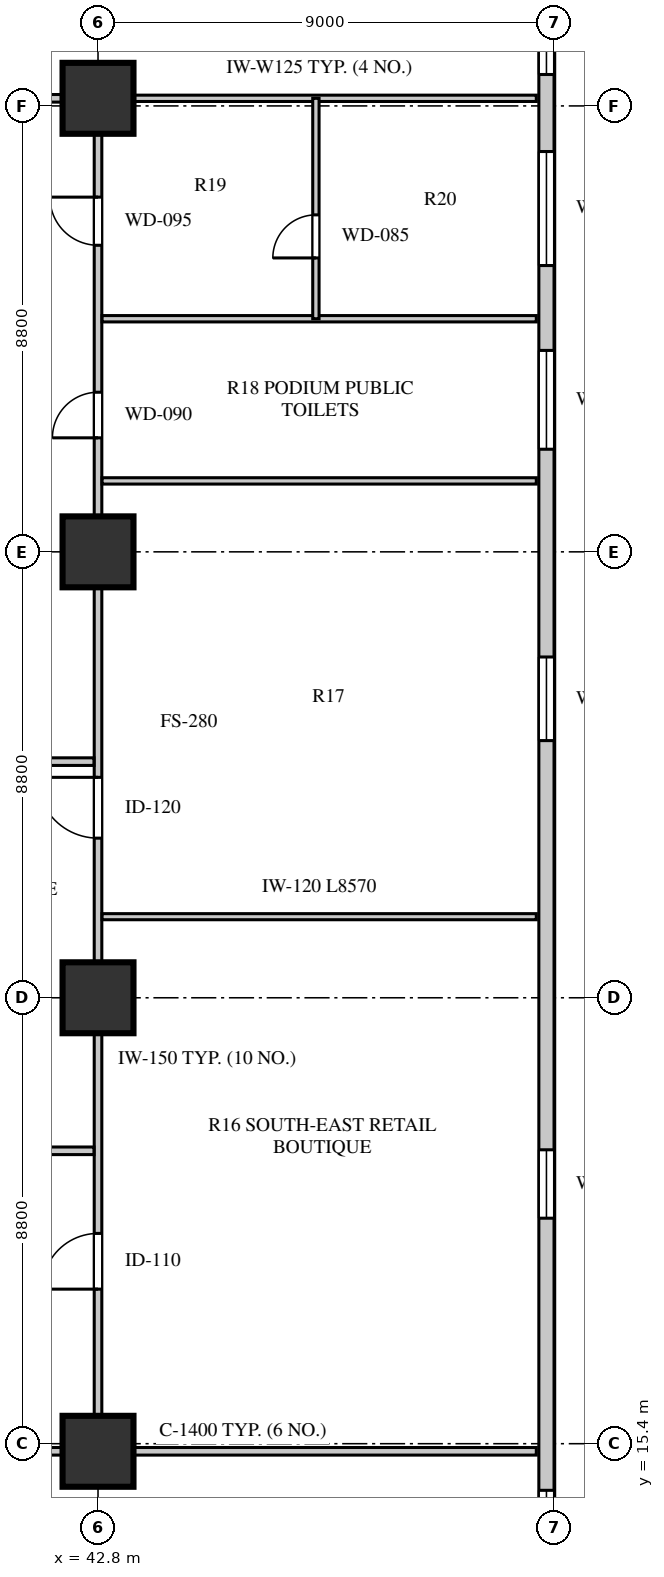
"""IFC4 building model, lengths in metres.
Left out: names, types, materials, properties, quantities, classifications, styles, units other than length and angle.
Written with IfcOpenShell. Run it as: python <this file> out.ifc"""

import sys

from ifc_helpers import new_model, si_unit, direction, frame, frame_2d, origin, origin_2d, place, context, subcontext, project, spatial, rectangle, extrude, element, fill, save


model = new_model("IFC4")
c1 = context("Model", 3, precision=1e-05, world=origin(), true_north=direction((0.0, 1.0)))
c2 = subcontext(c1, "Body", "Model", "MODEL_VIEW")
j1 = project(units=[si_unit("LENGTHUNIT", "METRE"), si_unit("PLANEANGLEUNIT", "RADIAN")], contexts=[c1])
p1 = place(None, origin())
s1 = spatial("IfcSite", under=j1, at=p1, CompositionType="ELEMENT")
p2 = place(p1, origin())
s2 = spatial("IfcBuilding", under=s1, at=p2, CompositionType="ELEMENT")
p3 = place(p2, frame((0.0, 0.0, 12.5)))
s3 = spatial("IfcBuildingStorey", under=s2, at=p3, CompositionType="ELEMENT", Elevation=12.5)
for number, where, z_axis, x_axis in (
    (1, (42.8, 15.25, 0.0), (0.0, 0.0, 1.0), (1.0, 0.0, 0.0)),
    (2, (42.8, 24.2, 0.0), (0.0, 0.0, 1.0), (1.0, 0.0, 0.0)),
    (3, (42.8, 33.0, 0.0), (0.0, 0.0, 1.0), (1.0, 0.0, 0.0)),
    (4, (42.8, 41.95, 0.0), (0.0, 0.0, 1.0), (1.0, 0.0, 0.0)),
):
    element("IfcColumn", number, at=place(p3, frame(where, z_axis=z_axis, x_axis=x_axis)), inside=s3, PredefinedType="COLUMN", context=c2, shape_type="SweptSolid", body=[
        extrude(rectangle(XDim=1.4, YDim=1.4, at=origin_2d()), origin(), (0.0, 0.0, 1.0), 4.22),
    ])
p4 = place(p3, frame((51.65, 12.4, 0.0), z_axis=(0.0, 0.0, 1.0), x_axis=(0.0, 1.0, 0.0)))
e5 = element("IfcWall", 5, at=p4, inside=s3, PredefinedType="STANDARD", context=c2, shape_type="SweptSolid", body=[
    extrude(rectangle(XDim=32.4, YDim=0.3, at=frame_2d((16.2, 0.0))), origin(), (0.0, 0.0, 1.0), 4.22),
])
p5 = place(p4, frame((0.88, 0.0, 0.8)))
e6 = element("IfcOpeningElement", 6, at=p5, cuts=e5, PredefinedType="OPENING", context=c2, shape_type="SweptSolid", body=[
    extrude(rectangle(XDim=1.2, YDim=1.75, at=frame_2d((0.6, 0.875))), frame((0.0, 0.16, 0.0), z_axis=(0.0, -1.0, 0.0), x_axis=(1.0, 0.0, 0.0)), (0.0, 0.0, 1.0), 0.32),
])
p6 = place(p4, frame((7.45, 0.0, 0.8)))
e7 = element("IfcOpeningElement", 7, at=p6, cuts=e5, PredefinedType="OPENING", context=c2, shape_type="SweptSolid", body=[
    extrude(rectangle(XDim=1.35, YDim=1.9, at=frame_2d((0.675, 0.95))), frame((0.0, 0.16, 0.0), z_axis=(0.0, -1.0, 0.0), x_axis=(1.0, 0.0, 0.0)), (0.0, 0.0, 1.0), 0.32),
])
p7 = place(p4, frame((16.875, 0.0, 0.8)))
e8 = element("IfcOpeningElement", 8, at=p7, cuts=e5, PredefinedType="OPENING", context=c2, shape_type="SweptSolid", body=[
    extrude(rectangle(XDim=1.65, YDim=1.95, at=frame_2d((0.825, 0.975))), frame((0.0, 0.16, 0.0), z_axis=(0.0, -1.0, 0.0), x_axis=(1.0, 0.0, 0.0)), (0.0, 0.0, 1.0), 0.32),
])
p8 = place(p4, frame((22.625, 0.0, 0.8)))
e9 = element("IfcOpeningElement", 9, at=p8, cuts=e5, PredefinedType="OPENING", context=c2, shape_type="SweptSolid", body=[
    extrude(rectangle(XDim=1.95, YDim=2.0, at=frame_2d((0.975, 1.0))), frame((0.0, 0.16, 0.0), z_axis=(0.0, -1.0, 0.0), x_axis=(1.0, 0.0, 0.0)), (0.0, 0.0, 1.0), 0.32),
])
p9 = place(p4, frame((26.25, 0.0, 0.8)))
e10 = element("IfcOpeningElement", 10, at=p9, cuts=e5, PredefinedType="OPENING", context=c2, shape_type="SweptSolid", body=[
    extrude(rectangle(XDim=2.25, YDim=2.0, at=frame_2d((1.125, 1.0))), frame((0.0, 0.16, 0.0), z_axis=(0.0, -1.0, 0.0), x_axis=(1.0, 0.0, 0.0)), (0.0, 0.0, 1.0), 0.32),
])
p10 = place(p4, frame((30.02, 0.0, 0.8)))
e11 = element("IfcOpeningElement", 11, at=p10, cuts=e5, PredefinedType="OPENING", context=c2, shape_type="SweptSolid", body=[
    extrude(rectangle(XDim=1.8, YDim=2.0, at=frame_2d((0.9, 1.0))), frame((0.0, 0.16, 0.0), z_axis=(0.0, -1.0, 0.0), x_axis=(1.0, 0.0, 0.0)), (0.0, 0.0, 1.0), 0.32),
])
p11 = place(p3, frame((42.8, 15.25, 0.0), z_axis=(0.0, 0.0, 1.0), x_axis=(0.0, 1.0, 0.0)))
e12 = element("IfcWall", 12, at=p11, inside=s3, PredefinedType="PARTITIONING", context=c2, shape_type="SweptSolid", body=[
    extrude(rectangle(XDim=26.7, YDim=0.15, at=frame_2d((13.35, 0.0))), origin(), (0.0, 0.0, 1.0), 3.42),
])
p12 = place(p11, frame((3.2, 0.0, 0.0)))
e13 = element("IfcOpeningElement", 13, at=p12, cuts=e12, PredefinedType="OPENING", context=c2, shape_type="SweptSolid", body=[
    extrude(rectangle(XDim=1.1, YDim=2.08, at=frame_2d((0.55, 1.04))), frame((0.0, 0.085, 0.0), z_axis=(0.0, -1.0, 0.0), x_axis=(1.0, 0.0, 0.0)), (0.0, 0.0, 1.0), 0.17),
])
p13 = place(p11, frame((12.1, 0.0, 0.0)))
e14 = element("IfcOpeningElement", 14, at=p13, cuts=e12, PredefinedType="OPENING", context=c2, shape_type="SweptSolid", body=[
    extrude(rectangle(XDim=1.2, YDim=2.1, at=frame_2d((0.6, 1.05))), frame((0.0, 0.085, 0.0), z_axis=(0.0, -1.0, 0.0), x_axis=(1.0, 0.0, 0.0)), (0.0, 0.0, 1.0), 0.17),
])
p14 = place(p11, frame((20.0, 0.0, 0.0)))
e15 = element("IfcOpeningElement", 15, at=p14, cuts=e12, PredefinedType="OPENING", context=c2, shape_type="SweptSolid", body=[
    extrude(rectangle(XDim=0.9, YDim=2.05, at=frame_2d((0.45, 1.025))), frame((0.0, 0.085, 0.0), z_axis=(0.0, -1.0, 0.0), x_axis=(1.0, 0.0, 0.0)), (0.0, 0.0, 1.0), 0.17),
])
p15 = place(p11, frame((23.8, 0.0, 0.0)))
e16 = element("IfcOpeningElement", 16, at=p15, cuts=e12, PredefinedType="OPENING", context=c2, shape_type="SweptSolid", body=[
    extrude(rectangle(XDim=0.95, YDim=2.05, at=frame_2d((0.475, 1.025))), frame((0.0, 0.085, 0.0), z_axis=(0.0, -1.0, 0.0), x_axis=(1.0, 0.0, 0.0)), (0.0, 0.0, 1.0), 0.17),
])
p16 = place(p3, frame((38.75, 15.25, 0.0), z_axis=(0.0, 0.0, 1.0), x_axis=(1.0, 0.0, 0.0)))
e17 = element("IfcWall", 17, at=p16, inside=s3, PredefinedType="PARTITIONING", context=c2, shape_type="SweptSolid", body=[
    extrude(rectangle(XDim=12.7, YDim=0.15, at=frame_2d((6.35, 0.0))), origin(), (0.0, 0.0, 1.0), 3.42),
])
p17 = place(p3, frame((42.88, 41.95, 0.0), z_axis=(0.0, 0.0, 1.0), x_axis=(1.0, 0.0, 0.0)))
e18 = element("IfcWall", 18, at=p17, inside=s3, PredefinedType="PLUMBINGWALL", context=c2, shape_type="SweptSolid", body=[
    extrude(rectangle(XDim=8.57, YDim=0.125, at=frame_2d((4.285, 0.0))), origin(), (0.0, 0.0, 1.0), 3.72),
])
p18 = place(p3, frame((38.92, 21.18, 0.0), z_axis=(0.0, 0.0, 1.0), x_axis=(1.0, 0.0, 0.0)))
e19 = element("IfcWall", 19, at=p18, inside=s3, PredefinedType="PARTITIONING", context=c2, shape_type="SweptSolid", body=[
    extrude(rectangle(XDim=3.8, YDim=0.15, at=frame_2d((1.9, 0.0))), origin(), (0.0, 0.0, 1.0), 4.22),
])
p19 = place(p18, frame((1.1, 0.0, 0.0)))
e20 = element("IfcOpeningElement", 20, at=p19, cuts=e19, PredefinedType="OPENING", context=c2, shape_type="SweptSolid", body=[
    extrude(rectangle(XDim=1.05, YDim=2.1, at=frame_2d((0.525, 1.05))), frame((0.0, 0.085, 0.0), z_axis=(0.0, -1.0, 0.0), x_axis=(1.0, 0.0, 0.0)), (0.0, 0.0, 1.0), 0.17),
])
p20 = place(p3, frame((39.28, 28.86, 0.0), z_axis=(0.0, 0.0, 1.0), x_axis=(1.0, 0.0, 0.0)))
e21 = element("IfcWall", 21, at=p20, inside=s3, PredefinedType="PARTITIONING", context=c2, shape_type="SweptSolid", body=[
    extrude(rectangle(XDim=3.44, YDim=0.15, at=frame_2d((1.72, 0.0))), origin(), (0.0, 0.0, 1.0), 4.22),
])
p21 = place(p20, frame((0.74, 0.0, 0.0)))
e22 = element("IfcOpeningElement", 22, at=p21, cuts=e21, PredefinedType="OPENING", context=c2, shape_type="SweptSolid", body=[
    extrude(rectangle(XDim=0.95, YDim=2.08, at=frame_2d((0.475, 1.04))), frame((0.0, 0.085, 0.0), z_axis=(0.0, -1.0, 0.0), x_axis=(1.0, 0.0, 0.0)), (0.0, 0.0, 1.0), 0.17),
])
p22 = place(p3, frame((38.92, 41.95, 0.0), z_axis=(0.0, 0.0, 1.0), x_axis=(1.0, 0.0, 0.0)))
e23 = element("IfcWall", 23, at=p22, inside=s3, PredefinedType="PARTITIONING", context=c2, shape_type="SweptSolid", body=[
    extrude(rectangle(XDim=3.88, YDim=0.15, at=frame_2d((1.94, 0.0))), origin(), (0.0, 0.0, 1.0), 3.42),
])
p23 = place(p3, frame((42.88, 25.8, 0.0), z_axis=(0.0, 0.0, 1.0), x_axis=(1.0, 0.0, 0.0)))
e24 = element("IfcWall", 24, at=p23, inside=s3, PredefinedType="PARTITIONING", context=c2, shape_type="SweptSolid", body=[
    extrude(rectangle(XDim=8.57, YDim=0.12, at=frame_2d((4.285, 0.0))), origin(), (0.0, 0.0, 1.0), 4.22),
])
for number, where, z_axis, x_axis in (
    (25, (42.88, 34.4, 0.0), (0.0, 0.0, 1.0), (1.0, 0.0, 0.0)),
    (26, (42.88, 37.6, 0.0), (0.0, 0.0, 1.0), (1.0, 0.0, 0.0)),
):
    element("IfcWall", number, at=place(p3, frame(where, z_axis=z_axis, x_axis=x_axis)), inside=s3, PredefinedType="PLUMBINGWALL", context=c2, shape_type="SweptSolid", body=[
        extrude(rectangle(XDim=8.57, YDim=0.125, at=frame_2d((4.285, 0.0))), origin(), (0.0, 0.0, 1.0), 4.22),
    ])
p24 = place(p3, frame((47.1, 37.6, 0.0), z_axis=(0.0, 0.0, 1.0), x_axis=(0.0, 1.0, 0.0)))
e27 = element("IfcWall", 27, at=p24, inside=s3, PredefinedType="PLUMBINGWALL", context=c2, shape_type="SweptSolid", body=[
    extrude(rectangle(XDim=4.35, YDim=0.125, at=frame_2d((2.175, 0.0))), origin(), (0.0, 0.0, 1.0), 4.22),
])
p25 = place(p24, frame((1.2, 0.0, 0.0)))
e28 = element("IfcOpeningElement", 28, at=p25, cuts=e27, PredefinedType="OPENING", context=c2, shape_type="SweptSolid", body=[
    extrude(rectangle(XDim=0.85, YDim=2.05, at=frame_2d((0.425, 1.025))), frame((0.0, 0.073, 0.0), z_axis=(0.0, -1.0, 0.0), x_axis=(1.0, 0.0, 0.0)), (0.0, 0.0, 1.0), 0.145),
])
p26 = place(p5, origin())
e29 = element("IfcWindow", 29, at=p26, inside=s3, PartitioningType="SINGLE_PANEL", PredefinedType="WINDOW", context=c2, shape_type="SweptSolid", body=[
    extrude(rectangle(XDim=1.2, YDim=1.75, at=frame_2d((0.6, 0.875))), frame((0.0, 0.03, 0.0), z_axis=(0.0, -1.0, 0.0), x_axis=(1.0, 0.0, 0.0)), (0.0, 0.0, 1.0), 0.06),
])
fill(e6, e29)
p27 = place(p6, origin())
e30 = element("IfcWindow", 30, at=p27, inside=s3, PartitioningType="SINGLE_PANEL", PredefinedType="WINDOW", context=c2, shape_type="SweptSolid", body=[
    extrude(rectangle(XDim=1.35, YDim=1.9, at=frame_2d((0.675, 0.95))), frame((0.0, 0.03, 0.0), z_axis=(0.0, -1.0, 0.0), x_axis=(1.0, 0.0, 0.0)), (0.0, 0.0, 1.0), 0.06),
])
fill(e7, e30)
p28 = place(p7, origin())
e31 = element("IfcWindow", 31, at=p28, inside=s3, PartitioningType="SINGLE_PANEL", PredefinedType="WINDOW", context=c2, shape_type="SweptSolid", body=[
    extrude(rectangle(XDim=1.65, YDim=1.95, at=frame_2d((0.825, 0.975))), frame((0.0, 0.03, 0.0), z_axis=(0.0, -1.0, 0.0), x_axis=(1.0, 0.0, 0.0)), (0.0, 0.0, 1.0), 0.06),
])
fill(e8, e31)
p29 = place(p8, origin())
e32 = element("IfcWindow", 32, at=p29, inside=s3, PartitioningType="SINGLE_PANEL", PredefinedType="WINDOW", context=c2, shape_type="SweptSolid", body=[
    extrude(rectangle(XDim=1.95, YDim=2.0, at=frame_2d((0.975, 1.0))), frame((0.0, 0.03, 0.0), z_axis=(0.0, -1.0, 0.0), x_axis=(1.0, 0.0, 0.0)), (0.0, 0.0, 1.0), 0.06),
])
fill(e9, e32)
p30 = place(p9, origin())
e33 = element("IfcWindow", 33, at=p30, inside=s3, PartitioningType="SINGLE_PANEL", PredefinedType="WINDOW", context=c2, shape_type="SweptSolid", body=[
    extrude(rectangle(XDim=2.25, YDim=2.0, at=frame_2d((1.125, 1.0))), frame((0.0, 0.03, 0.0), z_axis=(0.0, -1.0, 0.0), x_axis=(1.0, 0.0, 0.0)), (0.0, 0.0, 1.0), 0.06),
])
fill(e10, e33)
p31 = place(p10, origin())
e34 = element("IfcWindow", 34, at=p31, inside=s3, PartitioningType="SINGLE_PANEL", PredefinedType="WINDOW", context=c2, shape_type="SweptSolid", body=[
    extrude(rectangle(XDim=1.8, YDim=2.0, at=frame_2d((0.9, 1.0))), frame((0.0, 0.03, 0.0), z_axis=(0.0, -1.0, 0.0), x_axis=(1.0, 0.0, 0.0)), (0.0, 0.0, 1.0), 0.06),
])
fill(e11, e34)
p32 = place(p25, origin())
e35 = element("IfcDoor", 35, at=p32, inside=s3, OperationType="SINGLE_SWING_LEFT", PredefinedType="DOOR", context=c2, shape_type="SweptSolid", body=[
    extrude(rectangle(XDim=0.85, YDim=2.05, at=frame_2d((0.425, 1.025))), frame((0.0, 0.025, 0.0), z_axis=(0.0, -1.0, 0.0), x_axis=(1.0, 0.0, 0.0)), (0.0, 0.0, 1.0), 0.05),
])
fill(e28, e35)
p33 = place(p12, origin())
e36 = element("IfcDoor", 36, at=p33, inside=s3, OperationType="SINGLE_SWING_LEFT", PredefinedType="DOOR", context=c2, shape_type="SweptSolid", body=[
    extrude(rectangle(XDim=1.1, YDim=2.08, at=frame_2d((0.55, 1.04))), frame((0.0, 0.025, 0.0), z_axis=(0.0, -1.0, 0.0), x_axis=(1.0, 0.0, 0.0)), (0.0, 0.0, 1.0), 0.05),
])
fill(e13, e36)
p34 = place(p13, origin())
e37 = element("IfcDoor", 37, at=p34, inside=s3, OperationType="SINGLE_SWING_RIGHT", PredefinedType="DOOR", context=c2, shape_type="SweptSolid", body=[
    extrude(rectangle(XDim=1.2, YDim=2.1, at=frame_2d((0.6, 1.05))), frame((0.0, 0.025, 0.0), z_axis=(0.0, -1.0, 0.0), x_axis=(1.0, 0.0, 0.0)), (0.0, 0.0, 1.0), 0.05),
])
fill(e14, e37)
p35 = place(p14, origin())
e38 = element("IfcDoor", 38, at=p35, inside=s3, OperationType="SINGLE_SWING_LEFT", PredefinedType="DOOR", context=c2, shape_type="SweptSolid", body=[
    extrude(rectangle(XDim=0.9, YDim=2.05, at=frame_2d((0.45, 1.025))), frame((0.0, 0.025, 0.0), z_axis=(0.0, -1.0, 0.0), x_axis=(1.0, 0.0, 0.0)), (0.0, 0.0, 1.0), 0.05),
])
fill(e15, e38)
p36 = place(p15, origin())
e39 = element("IfcDoor", 39, at=p36, inside=s3, OperationType="SINGLE_SWING_RIGHT", PredefinedType="DOOR", context=c2, shape_type="SweptSolid", body=[
    extrude(rectangle(XDim=0.95, YDim=2.05, at=frame_2d((0.475, 1.025))), frame((0.0, 0.025, 0.0), z_axis=(0.0, -1.0, 0.0), x_axis=(1.0, 0.0, 0.0)), (0.0, 0.0, 1.0), 0.05),
])
fill(e16, e39)
save(model, sys.argv[1])
